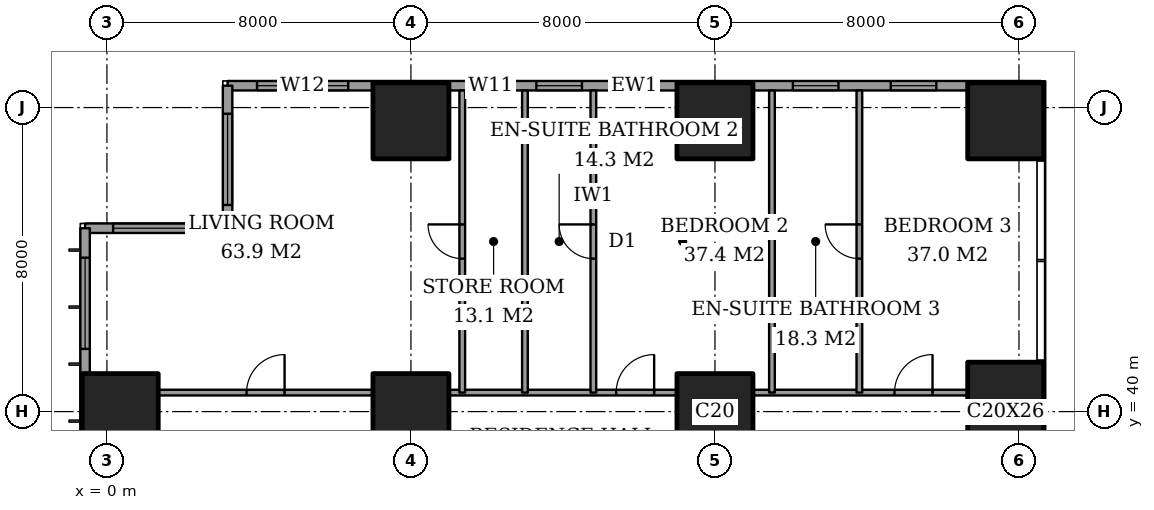
"""IFC4 building model, lengths in metres.
Left out: names, types, materials, properties, quantities, classifications, styles, units other than length and angle.
Written with IfcOpenShell. Run it as: python <this file> out.ifc"""

import sys

from ifc_helpers import new_model, si_unit, direction, frame, frame_2d, origin, origin_2d, place, context, subcontext, project, spatial, rectangle, extrude, element, fill, save


model = new_model("IFC4")
c1 = context("Model", 3, precision=1e-05, world=origin(), true_north=direction((0.0, 1.0)))
c2 = subcontext(c1, "Body", "Model", "MODEL_VIEW")
j1 = project(units=[si_unit("LENGTHUNIT", "METRE"), si_unit("PLANEANGLEUNIT", "RADIAN")], contexts=[c1])
p1 = place(None, origin())
s1 = spatial("IfcSite", under=j1, at=p1, CompositionType="ELEMENT")
p2 = place(p1, origin())
s2 = spatial("IfcBuilding", under=s1, at=p2, CompositionType="ELEMENT")
p3 = place(p2, frame((0.0, 0.0, 164.6)))
s3 = spatial("IfcBuildingStorey", under=s2, at=p3, CompositionType="ELEMENT", Elevation=164.6)
for number, where, z_axis, x_axis in (
    (1, (0.35, 40.0, 0.0), (0.0, 0.0, 1.0), (1.0, 0.0, 0.0)),
    (2, (8.0, 40.0, 0.0), (0.0, 0.0, 1.0), (1.0, 0.0, 0.0)),
    (3, (8.0, 47.65, 0.0), (0.0, 0.0, 1.0), (1.0, 0.0, 0.0)),
    (4, (16.0, 40.0, 0.0), (0.0, 0.0, 1.0), (1.0, 0.0, 0.0)),
    (5, (16.0, 47.65, 0.0), (0.0, 0.0, 1.0), (1.0, 0.0, 0.0)),
):
    element("IfcColumn", number, at=place(p3, frame(where, z_axis=z_axis, x_axis=x_axis)), inside=s3, PredefinedType="COLUMN", context=c2, shape_type="SweptSolid", body=[
        extrude(rectangle(XDim=2.0, YDim=2.0, at=origin_2d()), origin(), (0.0, 0.0, 1.0), 3.6),
    ])
p4 = place(p3, frame((23.65, 40.0, 0.0), z_axis=(0.0, 0.0, 1.0), x_axis=(1.0, 0.0, 0.0)))
e6 = element("IfcColumn", 6, at=p4, inside=s3, PredefinedType="COLUMN", context=c2, shape_type="SweptSolid", body=[
    extrude(rectangle(XDim=2.0, YDim=2.6, at=origin_2d()), origin(), (0.0, 0.0, 1.0), 3.6),
])
p5 = place(p3, frame((23.65, 47.65, 0.0), z_axis=(0.0, 0.0, 1.0), x_axis=(1.0, 0.0, 0.0)))
e7 = element("IfcColumn", 7, at=p5, inside=s3, PredefinedType="COLUMN", context=c2, shape_type="SweptSolid", body=[
    extrude(rectangle(XDim=2.0, YDim=2.0, at=origin_2d()), origin(), (0.0, 0.0, 1.0), 3.6),
])
p6 = place(p3, frame((24.575, 48.575, 0.0), z_axis=(0.0, 0.0, 1.0), x_axis=(-1.0, 0.0, 0.0)))
e8 = element("IfcWall", 8, at=p6, inside=s3, PredefinedType="SOLIDWALL", context=c2, shape_type="SweptSolid", body=[
    extrude(rectangle(XDim=21.4, YDim=0.25, at=frame_2d((10.7, 0.0))), origin(), (0.0, 0.0, 1.0), 3.6),
])
p7 = place(p6, frame((2.75, 0.0, 0.4)))
e9 = element("IfcOpeningElement", 9, at=p7, cuts=e8, PredefinedType="OPENING", context=c2, shape_type="SweptSolid", body=[
    extrude(rectangle(XDim=1.2, YDim=2.2, at=frame_2d((0.6, 1.1))), frame((0.0, 0.135, 0.0), z_axis=(0.0, -1.0, 0.0), x_axis=(1.0, 0.0, 0.0)), (0.0, 0.0, 1.0), 0.27),
])
p8 = place(p6, frame((5.325, 0.0, 0.4)))
e10 = element("IfcOpeningElement", 10, at=p8, cuts=e8, PredefinedType="OPENING", context=c2, shape_type="SweptSolid", body=[
    extrude(rectangle(XDim=1.2, YDim=2.2, at=frame_2d((0.6, 1.1))), frame((0.0, 0.135, 0.0), z_axis=(0.0, -1.0, 0.0), x_axis=(1.0, 0.0, 0.0)), (0.0, 0.0, 1.0), 0.27),
])
p9 = place(p6, frame((10.075, 0.0, 0.4)))
e11 = element("IfcOpeningElement", 11, at=p9, cuts=e8, PredefinedType="OPENING", context=c2, shape_type="SweptSolid", body=[
    extrude(rectangle(XDim=1.2, YDim=2.2, at=frame_2d((0.6, 1.1))), frame((0.0, 0.135, 0.0), z_axis=(0.0, -1.0, 0.0), x_axis=(1.0, 0.0, 0.0)), (0.0, 0.0, 1.0), 0.27),
])
p10 = place(p6, frame((12.075, 0.0, 0.4)))
e12 = element("IfcOpeningElement", 12, at=p10, cuts=e8, PredefinedType="OPENING", context=c2, shape_type="SweptSolid", body=[
    extrude(rectangle(XDim=1.2, YDim=2.2, at=frame_2d((0.6, 1.1))), frame((0.0, 0.135, 0.0), z_axis=(0.0, -1.0, 0.0), x_axis=(1.0, 0.0, 0.0)), (0.0, 0.0, 1.0), 0.27),
])
p11 = place(p6, frame((13.875, 0.0, 0.4)))
e13 = element("IfcOpeningElement", 13, at=p11, cuts=e8, PredefinedType="OPENING", context=c2, shape_type="SweptSolid", body=[
    extrude(rectangle(XDim=1.2, YDim=2.2, at=frame_2d((0.6, 1.1))), frame((0.0, 0.135, 0.0), z_axis=(0.0, -1.0, 0.0), x_axis=(1.0, 0.0, 0.0)), (0.0, 0.0, 1.0), 0.27),
])
p12 = place(p6, frame((18.225, 0.0, 0.4)))
e14 = element("IfcOpeningElement", 14, at=p12, cuts=e8, PredefinedType="OPENING", context=c2, shape_type="SweptSolid", body=[
    extrude(rectangle(XDim=2.4, YDim=2.2, at=frame_2d((1.2, 1.1))), frame((0.0, 0.135, 0.0), z_axis=(0.0, -1.0, 0.0), x_axis=(1.0, 0.0, 0.0)), (0.0, 0.0, 1.0), 0.27),
])
p13 = place(p3, frame((3.175, 48.575, 0.0), z_axis=(0.0, 0.0, 1.0), x_axis=(0.0, -1.0, 0.0)))
e15 = element("IfcWall", 15, at=p13, inside=s3, PredefinedType="SOLIDWALL", context=c2, shape_type="SweptSolid", body=[
    extrude(rectangle(XDim=3.75, YDim=0.25, at=frame_2d((1.875, 0.0))), origin(), (0.0, 0.0, 1.0), 3.6),
])
p14 = place(p13, frame((0.738, 0.0, 0.4)))
e16 = element("IfcOpeningElement", 16, at=p14, cuts=e15, PredefinedType="OPENING", context=c2, shape_type="SweptSolid", body=[
    extrude(rectangle(XDim=2.4, YDim=2.2, at=frame_2d((1.2, 1.1))), frame((0.0, 0.135, 0.0), z_axis=(0.0, -1.0, 0.0), x_axis=(1.0, 0.0, 0.0)), (0.0, 0.0, 1.0), 0.27),
])
p15 = place(p3, frame((3.175, 44.825, 0.0), z_axis=(0.0, 0.0, 1.0), x_axis=(-1.0, 0.0, 0.0)))
e17 = element("IfcWall", 17, at=p15, inside=s3, PredefinedType="SOLIDWALL", context=c2, shape_type="SweptSolid", body=[
    extrude(rectangle(XDim=3.75, YDim=0.25, at=frame_2d((1.875, 0.0))), origin(), (0.0, 0.0, 1.0), 3.6),
])
p16 = place(p15, frame((0.613, 0.0, 0.4)))
e18 = element("IfcOpeningElement", 18, at=p16, cuts=e17, PredefinedType="OPENING", context=c2, shape_type="SweptSolid", body=[
    extrude(rectangle(XDim=2.4, YDim=2.2, at=frame_2d((1.2, 1.1))), frame((0.0, 0.135, 0.0), z_axis=(0.0, -1.0, 0.0), x_axis=(1.0, 0.0, 0.0)), (0.0, 0.0, 1.0), 0.27),
])
p17 = place(p3, frame((-0.575, 44.825, 0.0), z_axis=(0.0, 0.0, 1.0), x_axis=(0.0, -1.0, 0.0)))
e19 = element("IfcWall", 19, at=p17, inside=s3, PredefinedType="SOLIDWALL", context=c2, shape_type="SweptSolid", body=[
    extrude(rectangle(XDim=41.65, YDim=0.25, at=frame_2d((20.825, 0.0))), origin(), (0.0, 0.0, 1.0), 3.6),
])
p18 = place(p17, frame((0.775, 0.0, 0.4)))
e20 = element("IfcOpeningElement", 20, at=p18, cuts=e19, PredefinedType="OPENING", context=c2, shape_type="SweptSolid", body=[
    extrude(rectangle(XDim=2.4, YDim=2.2, at=frame_2d((1.2, 1.1))), frame((0.0, 0.135, 0.0), z_axis=(0.0, -1.0, 0.0), x_axis=(1.0, 0.0, 0.0)), (0.0, 0.0, 1.0), 0.27),
])
p19 = place(p17, frame((6.1, 0.0, 0.4)))
e21 = element("IfcOpeningElement", 21, at=p19, cuts=e19, PredefinedType="OPENING", context=c2, shape_type="SweptSolid", body=[
    extrude(rectangle(XDim=1.2, YDim=2.2, at=frame_2d((0.6, 1.1))), frame((0.0, 0.135, 0.0), z_axis=(0.0, -1.0, 0.0), x_axis=(1.0, 0.0, 0.0)), (0.0, 0.0, 1.0), 0.27),
])
p20 = place(p17, frame((8.425, 0.0, 0.4)))
e22 = element("IfcOpeningElement", 22, at=p20, cuts=e19, PredefinedType="OPENING", context=c2, shape_type="SweptSolid", body=[
    extrude(rectangle(XDim=2.4, YDim=2.2, at=frame_2d((1.2, 1.1))), frame((0.0, 0.135, 0.0), z_axis=(0.0, -1.0, 0.0), x_axis=(1.0, 0.0, 0.0)), (0.0, 0.0, 1.0), 0.27),
])
p21 = place(p17, frame((15.625, 0.0, 0.4)))
e23 = element("IfcOpeningElement", 23, at=p21, cuts=e19, PredefinedType="OPENING", context=c2, shape_type="SweptSolid", body=[
    extrude(rectangle(XDim=2.4, YDim=2.2, at=frame_2d((1.2, 1.1))), frame((0.0, 0.135, 0.0), z_axis=(0.0, -1.0, 0.0), x_axis=(1.0, 0.0, 0.0)), (0.0, 0.0, 1.0), 0.27),
])
p22 = place(p17, frame((23.625, 0.0, 0.4)))
e24 = element("IfcOpeningElement", 24, at=p22, cuts=e19, PredefinedType="OPENING", context=c2, shape_type="SweptSolid", body=[
    extrude(rectangle(XDim=2.4, YDim=2.2, at=frame_2d((1.2, 1.1))), frame((0.0, 0.135, 0.0), z_axis=(0.0, -1.0, 0.0), x_axis=(1.0, 0.0, 0.0)), (0.0, 0.0, 1.0), 0.27),
])
p23 = place(p17, frame((30.825, 0.0, 0.4)))
e25 = element("IfcOpeningElement", 25, at=p23, cuts=e19, PredefinedType="OPENING", context=c2, shape_type="SweptSolid", body=[
    extrude(rectangle(XDim=2.4, YDim=2.2, at=frame_2d((1.2, 1.1))), frame((0.0, 0.135, 0.0), z_axis=(0.0, -1.0, 0.0), x_axis=(1.0, 0.0, 0.0)), (0.0, 0.0, 1.0), 0.27),
])
p24 = place(p17, frame((34.5, 0.0, 0.4)))
e26 = element("IfcOpeningElement", 26, at=p24, cuts=e19, PredefinedType="OPENING", context=c2, shape_type="SweptSolid", body=[
    extrude(rectangle(XDim=1.2, YDim=2.2, at=frame_2d((0.6, 1.1))), frame((0.0, 0.135, 0.0), z_axis=(0.0, -1.0, 0.0), x_axis=(1.0, 0.0, 0.0)), (0.0, 0.0, 1.0), 0.27),
])
p25 = place(p17, frame((38.475, 0.0, 0.4)))
e27 = element("IfcOpeningElement", 27, at=p25, cuts=e19, PredefinedType="OPENING", context=c2, shape_type="SweptSolid", body=[
    extrude(rectangle(XDim=2.4, YDim=2.2, at=frame_2d((1.2, 1.1))), frame((0.0, 0.135, 0.0), z_axis=(0.0, -1.0, 0.0), x_axis=(1.0, 0.0, 0.0)), (0.0, 0.0, 1.0), 0.27),
])
p26 = place(p3, frame((1.35, 40.5, 0.0), z_axis=(0.0, 0.0, 1.0), x_axis=(1.0, 0.0, 0.0)))
e28 = element("IfcWall", 28, at=p26, inside=s3, PredefinedType="PARTITIONING", context=c2, shape_type="SweptSolid", body=[
    extrude(rectangle(XDim=5.65, YDim=0.15, at=frame_2d((2.825, 0.0))), origin(), (0.0, 0.0, 1.0), 3.35),
])
p27 = place(p26, frame((2.325, 0.0, 0.0)))
e29 = element("IfcOpeningElement", 29, at=p27, cuts=e28, PredefinedType="OPENING", context=c2, shape_type="SweptSolid", body=[
    extrude(rectangle(XDim=1.0, YDim=2.1, at=frame_2d((0.5, 1.05))), frame((0.0, 0.085, 0.0), z_axis=(0.0, -1.0, 0.0), x_axis=(1.0, 0.0, 0.0)), (0.0, 0.0, 1.0), 0.17),
])
p28 = place(p3, frame((9.0, 40.5, 0.0), z_axis=(0.0, 0.0, 1.0), x_axis=(1.0, 0.0, 0.0)))
e30 = element("IfcWall", 30, at=p28, inside=s3, PredefinedType="PARTITIONING", context=c2, shape_type="SweptSolid", body=[
    extrude(rectangle(XDim=6.0, YDim=0.15, at=frame_2d((3.0, 0.0))), origin(), (0.0, 0.0, 1.0), 3.35),
])
p29 = place(p28, frame((4.4, 0.0, 0.0)))
e31 = element("IfcOpeningElement", 31, at=p29, cuts=e30, PredefinedType="OPENING", context=c2, shape_type="SweptSolid", body=[
    extrude(rectangle(XDim=1.0, YDim=2.1, at=frame_2d((0.5, 1.05))), frame((0.0, 0.085, 0.0), z_axis=(0.0, -1.0, 0.0), x_axis=(1.0, 0.0, 0.0)), (0.0, 0.0, 1.0), 0.17),
])
p30 = place(p3, frame((17.0, 40.5, 0.0), z_axis=(0.0, 0.0, 1.0), x_axis=(1.0, 0.0, 0.0)))
e32 = element("IfcWall", 32, at=p30, inside=s3, PredefinedType="PARTITIONING", context=c2, shape_type="SweptSolid", body=[
    extrude(rectangle(XDim=5.65, YDim=0.15, at=frame_2d((2.825, 0.0))), origin(), (0.0, 0.0, 1.0), 3.35),
])
p31 = place(p30, frame((3.725, 0.0, 0.0)))
e33 = element("IfcOpeningElement", 33, at=p31, cuts=e32, PredefinedType="OPENING", context=c2, shape_type="SweptSolid", body=[
    extrude(rectangle(XDim=1.0, YDim=2.1, at=frame_2d((0.5, 1.05))), frame((0.0, 0.085, 0.0), z_axis=(0.0, -1.0, 0.0), x_axis=(1.0, 0.0, 0.0)), (0.0, 0.0, 1.0), 0.17),
])
p32 = place(p3, frame((9.35, 40.5, 0.0), z_axis=(0.0, 0.0, 1.0), x_axis=(0.0, 1.0, 0.0)))
e34 = element("IfcWall", 34, at=p32, inside=s3, PredefinedType="PARTITIONING", context=c2, shape_type="SweptSolid", body=[
    extrude(rectangle(XDim=7.95, YDim=0.15, at=frame_2d((3.975, 0.0))), origin(), (0.0, 0.0, 1.0), 3.35),
])
p33 = place(p32, frame((3.525, 0.0, 0.0)))
e35 = element("IfcOpeningElement", 35, at=p33, cuts=e34, PredefinedType="OPENING", context=c2, shape_type="SweptSolid", body=[
    extrude(rectangle(XDim=0.9, YDim=2.1, at=frame_2d((0.45, 1.05))), frame((0.0, 0.085, 0.0), z_axis=(0.0, -1.0, 0.0), x_axis=(1.0, 0.0, 0.0)), (0.0, 0.0, 1.0), 0.17),
])
p34 = place(p3, frame((11.0, 40.5, 0.0), z_axis=(0.0, 0.0, 1.0), x_axis=(0.0, 1.0, 0.0)))
e36 = element("IfcWall", 36, at=p34, inside=s3, PredefinedType="PARTITIONING", context=c2, shape_type="SweptSolid", body=[
    extrude(rectangle(XDim=7.95, YDim=0.15, at=frame_2d((3.975, 0.0))), origin(), (0.0, 0.0, 1.0), 3.35),
])
p35 = place(p3, frame((12.8, 40.5, 0.0), z_axis=(0.0, 0.0, 1.0), x_axis=(0.0, 1.0, 0.0)))
e37 = element("IfcWall", 37, at=p35, inside=s3, PredefinedType="PARTITIONING", context=c2, shape_type="SweptSolid", body=[
    extrude(rectangle(XDim=7.95, YDim=0.15, at=frame_2d((3.975, 0.0))), origin(), (0.0, 0.0, 1.0), 3.35),
])
p36 = place(p35, frame((3.525, 0.0, 0.0)))
e38 = element("IfcOpeningElement", 38, at=p36, cuts=e37, PredefinedType="OPENING", context=c2, shape_type="SweptSolid", body=[
    extrude(rectangle(XDim=0.9, YDim=2.1, at=frame_2d((0.45, 1.05))), frame((0.0, 0.085, 0.0), z_axis=(0.0, -1.0, 0.0), x_axis=(1.0, 0.0, 0.0)), (0.0, 0.0, 1.0), 0.17),
])
p37 = place(p3, frame((17.5, 40.5, 0.0), z_axis=(0.0, 0.0, 1.0), x_axis=(0.0, 1.0, 0.0)))
e39 = element("IfcWall", 39, at=p37, inside=s3, PredefinedType="PARTITIONING", context=c2, shape_type="SweptSolid", body=[
    extrude(rectangle(XDim=7.95, YDim=0.15, at=frame_2d((3.975, 0.0))), origin(), (0.0, 0.0, 1.0), 3.35),
])
p38 = place(p3, frame((19.8, 40.5, 0.0), z_axis=(0.0, 0.0, 1.0), x_axis=(0.0, 1.0, 0.0)))
e40 = element("IfcWall", 40, at=p38, inside=s3, PredefinedType="PARTITIONING", context=c2, shape_type="SweptSolid", body=[
    extrude(rectangle(XDim=7.95, YDim=0.15, at=frame_2d((3.975, 0.0))), origin(), (0.0, 0.0, 1.0), 3.35),
])
p39 = place(p38, frame((3.525, 0.0, 0.0)))
e41 = element("IfcOpeningElement", 41, at=p39, cuts=e40, PredefinedType="OPENING", context=c2, shape_type="SweptSolid", body=[
    extrude(rectangle(XDim=0.9, YDim=2.1, at=frame_2d((0.45, 1.05))), frame((0.0, 0.085, 0.0), z_axis=(0.0, -1.0, 0.0), x_axis=(1.0, 0.0, 0.0)), (0.0, 0.0, 1.0), 0.17),
])
p40 = place(p7, origin())
e42 = element("IfcWindow", 42, at=p40, inside=s3, PartitioningType="SINGLE_PANEL", PredefinedType="WINDOW", context=c2, shape_type="SweptSolid", body=[
    extrude(rectangle(XDim=1.2, YDim=2.2, at=frame_2d((0.6, 1.1))), frame((0.0, 0.03, 0.0), z_axis=(0.0, -1.0, 0.0), x_axis=(1.0, 0.0, 0.0)), (0.0, 0.0, 1.0), 0.06),
])
fill(e9, e42)
p41 = place(p8, origin())
e43 = element("IfcWindow", 43, at=p41, inside=s3, PartitioningType="SINGLE_PANEL", PredefinedType="WINDOW", context=c2, shape_type="SweptSolid", body=[
    extrude(rectangle(XDim=1.2, YDim=2.2, at=frame_2d((0.6, 1.1))), frame((0.0, 0.03, 0.0), z_axis=(0.0, -1.0, 0.0), x_axis=(1.0, 0.0, 0.0)), (0.0, 0.0, 1.0), 0.06),
])
fill(e10, e43)
p42 = place(p9, origin())
e44 = element("IfcWindow", 44, at=p42, inside=s3, PartitioningType="SINGLE_PANEL", PredefinedType="WINDOW", context=c2, shape_type="SweptSolid", body=[
    extrude(rectangle(XDim=1.2, YDim=2.2, at=frame_2d((0.6, 1.1))), frame((0.0, 0.03, 0.0), z_axis=(0.0, -1.0, 0.0), x_axis=(1.0, 0.0, 0.0)), (0.0, 0.0, 1.0), 0.06),
])
fill(e11, e44)
p43 = place(p10, origin())
e45 = element("IfcWindow", 45, at=p43, inside=s3, PartitioningType="SINGLE_PANEL", PredefinedType="WINDOW", context=c2, shape_type="SweptSolid", body=[
    extrude(rectangle(XDim=1.2, YDim=2.2, at=frame_2d((0.6, 1.1))), frame((0.0, 0.03, 0.0), z_axis=(0.0, -1.0, 0.0), x_axis=(1.0, 0.0, 0.0)), (0.0, 0.0, 1.0), 0.06),
])
fill(e12, e45)
p44 = place(p11, origin())
e46 = element("IfcWindow", 46, at=p44, inside=s3, PartitioningType="SINGLE_PANEL", PredefinedType="WINDOW", context=c2, shape_type="SweptSolid", body=[
    extrude(rectangle(XDim=1.2, YDim=2.2, at=frame_2d((0.6, 1.1))), frame((0.0, 0.03, 0.0), z_axis=(0.0, -1.0, 0.0), x_axis=(1.0, 0.0, 0.0)), (0.0, 0.0, 1.0), 0.06),
])
fill(e13, e46)
p45 = place(p12, origin())
e47 = element("IfcWindow", 47, at=p45, inside=s3, PartitioningType="SINGLE_PANEL", PredefinedType="WINDOW", context=c2, shape_type="SweptSolid", body=[
    extrude(rectangle(XDim=2.4, YDim=2.2, at=frame_2d((1.2, 1.1))), frame((0.0, 0.03, 0.0), z_axis=(0.0, -1.0, 0.0), x_axis=(1.0, 0.0, 0.0)), (0.0, 0.0, 1.0), 0.06),
])
fill(e14, e47)
p46 = place(p14, origin())
e48 = element("IfcWindow", 48, at=p46, inside=s3, PartitioningType="SINGLE_PANEL", PredefinedType="WINDOW", context=c2, shape_type="SweptSolid", body=[
    extrude(rectangle(XDim=2.4, YDim=2.2, at=frame_2d((1.2, 1.1))), frame((0.0, 0.03, 0.0), z_axis=(0.0, -1.0, 0.0), x_axis=(1.0, 0.0, 0.0)), (0.0, 0.0, 1.0), 0.06),
])
fill(e16, e48)
p47 = place(p16, origin())
e49 = element("IfcWindow", 49, at=p47, inside=s3, PartitioningType="SINGLE_PANEL", PredefinedType="WINDOW", context=c2, shape_type="SweptSolid", body=[
    extrude(rectangle(XDim=2.4, YDim=2.2, at=frame_2d((1.2, 1.1))), frame((0.0, 0.03, 0.0), z_axis=(0.0, -1.0, 0.0), x_axis=(1.0, 0.0, 0.0)), (0.0, 0.0, 1.0), 0.06),
])
fill(e18, e49)
p48 = place(p18, origin())
e50 = element("IfcWindow", 50, at=p48, inside=s3, PartitioningType="SINGLE_PANEL", PredefinedType="WINDOW", context=c2, shape_type="SweptSolid", body=[
    extrude(rectangle(XDim=2.4, YDim=2.2, at=frame_2d((1.2, 1.1))), frame((0.0, 0.03, 0.0), z_axis=(0.0, -1.0, 0.0), x_axis=(1.0, 0.0, 0.0)), (0.0, 0.0, 1.0), 0.06),
])
fill(e20, e50)
p49 = place(p27, origin())
e51 = element("IfcDoor", 51, at=p49, inside=s3, OperationType="SINGLE_SWING_LEFT", PredefinedType="DOOR", context=c2, shape_type="SweptSolid", body=[
    extrude(rectangle(XDim=1.0, YDim=2.1, at=frame_2d((0.5, 1.05))), frame((0.0, 0.025, 0.0), z_axis=(0.0, -1.0, 0.0), x_axis=(1.0, 0.0, 0.0)), (0.0, 0.0, 1.0), 0.05),
])
fill(e29, e51)
p50 = place(p33, origin())
e52 = element("IfcDoor", 52, at=p50, inside=s3, OperationType="SINGLE_SWING_LEFT", PredefinedType="DOOR", context=c2, shape_type="SweptSolid", body=[
    extrude(rectangle(XDim=0.9, YDim=2.1, at=frame_2d((0.45, 1.05))), frame((0.0, 0.025, 0.0), z_axis=(0.0, -1.0, 0.0), x_axis=(1.0, 0.0, 0.0)), (0.0, 0.0, 1.0), 0.05),
])
fill(e35, e52)
p51 = place(p36, origin())
e53 = element("IfcDoor", 53, at=p51, inside=s3, OperationType="SINGLE_SWING_LEFT", PredefinedType="DOOR", context=c2, shape_type="SweptSolid", body=[
    extrude(rectangle(XDim=0.9, YDim=2.1, at=frame_2d((0.45, 1.05))), frame((0.0, 0.025, 0.0), z_axis=(0.0, -1.0, 0.0), x_axis=(1.0, 0.0, 0.0)), (0.0, 0.0, 1.0), 0.05),
])
fill(e38, e53)
p52 = place(p29, origin())
e54 = element("IfcDoor", 54, at=p52, inside=s3, OperationType="SINGLE_SWING_LEFT", PredefinedType="DOOR", context=c2, shape_type="SweptSolid", body=[
    extrude(rectangle(XDim=1.0, YDim=2.1, at=frame_2d((0.5, 1.05))), frame((0.0, 0.025, 0.0), z_axis=(0.0, -1.0, 0.0), x_axis=(1.0, 0.0, 0.0)), (0.0, 0.0, 1.0), 0.05),
])
fill(e31, e54)
p53 = place(p39, origin())
e55 = element("IfcDoor", 55, at=p53, inside=s3, OperationType="SINGLE_SWING_LEFT", PredefinedType="DOOR", context=c2, shape_type="SweptSolid", body=[
    extrude(rectangle(XDim=0.9, YDim=2.1, at=frame_2d((0.45, 1.05))), frame((0.0, 0.025, 0.0), z_axis=(0.0, -1.0, 0.0), x_axis=(1.0, 0.0, 0.0)), (0.0, 0.0, 1.0), 0.05),
])
fill(e41, e55)
p54 = place(p31, origin())
e56 = element("IfcDoor", 56, at=p54, inside=s3, OperationType="SINGLE_SWING_LEFT", PredefinedType="DOOR", context=c2, shape_type="SweptSolid", body=[
    extrude(rectangle(XDim=1.0, YDim=2.1, at=frame_2d((0.5, 1.05))), frame((0.0, 0.025, 0.0), z_axis=(0.0, -1.0, 0.0), x_axis=(1.0, 0.0, 0.0)), (0.0, 0.0, 1.0), 0.05),
])
fill(e33, e56)
save(model, sys.argv[1])
